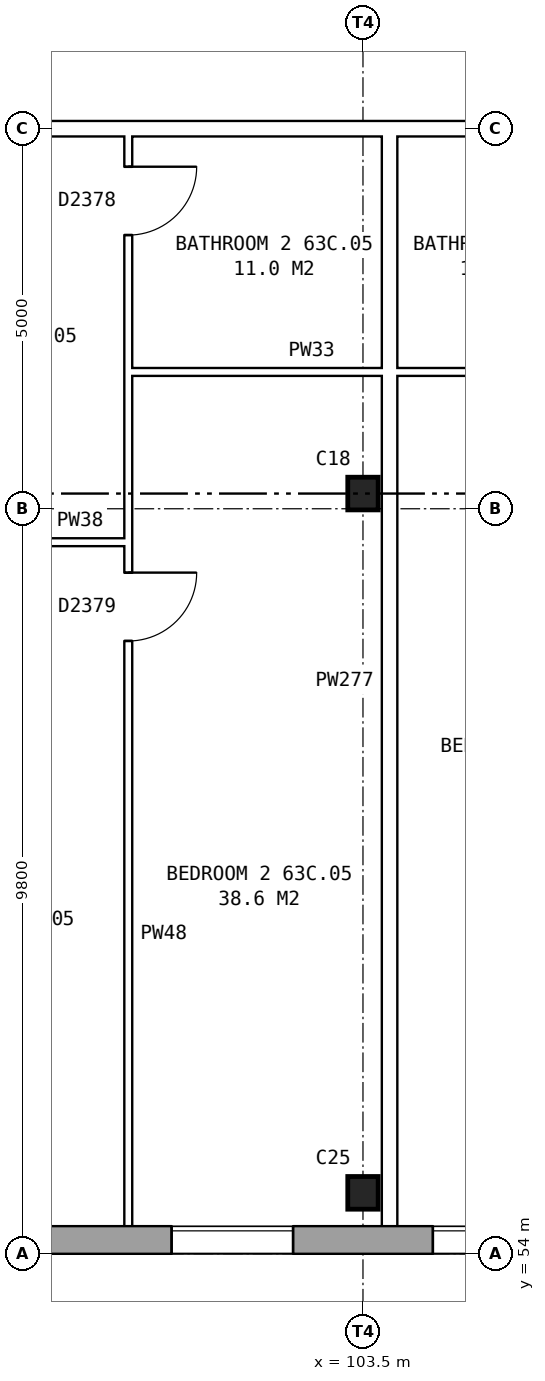
"""IFC4 building model, lengths in metres.
Left out: names, types, materials, properties, quantities, classifications, styles, units other than length and angle.
Written with IfcOpenShell. Run it as: python <this file> out.ifc"""

import sys

from ifc_helpers import new_model, si_unit, direction, frame, frame_2d, origin, origin_2d, place, context, subcontext, project, spatial, rectangle, i_section, extrude, element, fill, save


model = new_model("IFC4")
c1 = context("Model", 3, precision=1e-05, world=origin(), true_north=direction((0.0, 1.0)))
c2 = subcontext(c1, "Body", "Model", "MODEL_VIEW")
j1 = project(units=[si_unit("LENGTHUNIT", "METRE"), si_unit("PLANEANGLEUNIT", "RADIAN")], contexts=[c1])
p1 = place(None, origin())
s1 = spatial("IfcSite", under=j1, at=p1, CompositionType="ELEMENT")
p2 = place(p1, origin())
s2 = spatial("IfcBuilding", under=s1, at=p2, CompositionType="ELEMENT")
p3 = place(p2, frame((0.0, 0.0, 224.5)))
s3 = spatial("IfcBuildingStorey", under=s2, at=p3, CompositionType="ELEMENT", Elevation=224.5)
for number, where, z_axis, x_axis in (
    (1, (103.5, 54.8, 0.0), (0.0, 0.0, 1.0), (1.0, 0.0, 0.0)),
    (2, (103.5, 64.0, 0.0), (0.0, 0.0, 1.0), (1.0, 0.0, 0.0)),
):
    element("IfcColumn", number, at=place(p3, frame(where, z_axis=z_axis, x_axis=x_axis)), inside=s3, PredefinedType="COLUMN", context=c2, shape_type="SweptSolid", body=[
        extrude(i_section(OverallWidth=0.4, OverallDepth=0.43, WebThickness=0.04, FlangeThickness=0.04, at=origin_2d()), origin(), (0.0, 0.0, 1.0), 2.85),
    ])
p4 = place(p3, frame((75.95, 54.18, 0.0), z_axis=(0.0, 0.0, 1.0), x_axis=(1.0, 0.0, 0.0)))
e3 = element("IfcWall", 3, at=p4, inside=s3, PredefinedType="STANDARD", context=c2, shape_type="SweptSolid", body=[
    extrude(rectangle(XDim=55.1, YDim=0.36, at=frame_2d((27.55, 0.0))), origin(), (0.0, 0.0, 1.0), 2.85),
])
p5 = place(p4, frame((0.969, 0.0, 0.8)))
e4 = element("IfcOpeningElement", 4, at=p5, cuts=e3, PredefinedType="OPENING", context=c2, shape_type="SweptSolid", body=[
    extrude(rectangle(XDim=1.6, YDim=1.8, at=frame_2d((0.8, 0.9))), frame((0.0, 0.19, 0.0), z_axis=(0.0, -1.0, 0.0), x_axis=(1.0, 0.0, 0.0)), (0.0, 0.0, 1.0), 0.38),
])
p6 = place(p4, frame((4.406, 0.0, 0.8)))
e5 = element("IfcOpeningElement", 5, at=p6, cuts=e3, PredefinedType="OPENING", context=c2, shape_type="SweptSolid", body=[
    extrude(rectangle(XDim=1.6, YDim=1.8, at=frame_2d((0.8, 0.9))), frame((0.0, 0.19, 0.0), z_axis=(0.0, -1.0, 0.0), x_axis=(1.0, 0.0, 0.0)), (0.0, 0.0, 1.0), 0.38),
])
p7 = place(p4, frame((7.844, 0.0, 0.8)))
e6 = element("IfcOpeningElement", 6, at=p7, cuts=e3, PredefinedType="OPENING", context=c2, shape_type="SweptSolid", body=[
    extrude(rectangle(XDim=1.6, YDim=1.8, at=frame_2d((0.8, 0.9))), frame((0.0, 0.19, 0.0), z_axis=(0.0, -1.0, 0.0), x_axis=(1.0, 0.0, 0.0)), (0.0, 0.0, 1.0), 0.38),
])
p8 = place(p4, frame((11.281, 0.0, 0.8)))
e7 = element("IfcOpeningElement", 7, at=p8, cuts=e3, PredefinedType="OPENING", context=c2, shape_type="SweptSolid", body=[
    extrude(rectangle(XDim=1.6, YDim=1.8, at=frame_2d((0.8, 0.9))), frame((0.0, 0.19, 0.0), z_axis=(0.0, -1.0, 0.0), x_axis=(1.0, 0.0, 0.0)), (0.0, 0.0, 1.0), 0.38),
])
p9 = place(p4, frame((14.719, 0.0, 0.8)))
e8 = element("IfcOpeningElement", 8, at=p9, cuts=e3, PredefinedType="OPENING", context=c2, shape_type="SweptSolid", body=[
    extrude(rectangle(XDim=1.6, YDim=1.8, at=frame_2d((0.8, 0.9))), frame((0.0, 0.19, 0.0), z_axis=(0.0, -1.0, 0.0), x_axis=(1.0, 0.0, 0.0)), (0.0, 0.0, 1.0), 0.38),
])
p10 = place(p4, frame((18.156, 0.0, 0.8)))
e9 = element("IfcOpeningElement", 9, at=p10, cuts=e3, PredefinedType="OPENING", context=c2, shape_type="SweptSolid", body=[
    extrude(rectangle(XDim=1.6, YDim=1.8, at=frame_2d((0.8, 0.9))), frame((0.0, 0.19, 0.0), z_axis=(0.0, -1.0, 0.0), x_axis=(1.0, 0.0, 0.0)), (0.0, 0.0, 1.0), 0.38),
])
p11 = place(p4, frame((21.594, 0.0, 0.8)))
e10 = element("IfcOpeningElement", 10, at=p11, cuts=e3, PredefinedType="OPENING", context=c2, shape_type="SweptSolid", body=[
    extrude(rectangle(XDim=1.6, YDim=1.8, at=frame_2d((0.8, 0.9))), frame((0.0, 0.19, 0.0), z_axis=(0.0, -1.0, 0.0), x_axis=(1.0, 0.0, 0.0)), (0.0, 0.0, 1.0), 0.38),
])
p12 = place(p4, frame((25.031, 0.0, 0.8)))
e11 = element("IfcOpeningElement", 11, at=p12, cuts=e3, PredefinedType="OPENING", context=c2, shape_type="SweptSolid", body=[
    extrude(rectangle(XDim=1.6, YDim=1.8, at=frame_2d((0.8, 0.9))), frame((0.0, 0.19, 0.0), z_axis=(0.0, -1.0, 0.0), x_axis=(1.0, 0.0, 0.0)), (0.0, 0.0, 1.0), 0.38),
])
p13 = place(p4, frame((28.469, 0.0, 0.8)))
e12 = element("IfcOpeningElement", 12, at=p13, cuts=e3, PredefinedType="OPENING", context=c2, shape_type="SweptSolid", body=[
    extrude(rectangle(XDim=1.6, YDim=1.8, at=frame_2d((0.8, 0.9))), frame((0.0, 0.19, 0.0), z_axis=(0.0, -1.0, 0.0), x_axis=(1.0, 0.0, 0.0)), (0.0, 0.0, 1.0), 0.38),
])
p14 = place(p4, frame((31.906, 0.0, 0.8)))
e13 = element("IfcOpeningElement", 13, at=p14, cuts=e3, PredefinedType="OPENING", context=c2, shape_type="SweptSolid", body=[
    extrude(rectangle(XDim=1.6, YDim=1.8, at=frame_2d((0.8, 0.9))), frame((0.0, 0.19, 0.0), z_axis=(0.0, -1.0, 0.0), x_axis=(1.0, 0.0, 0.0)), (0.0, 0.0, 1.0), 0.38),
])
p15 = place(p4, frame((35.344, 0.0, 0.8)))
e14 = element("IfcOpeningElement", 14, at=p15, cuts=e3, PredefinedType="OPENING", context=c2, shape_type="SweptSolid", body=[
    extrude(rectangle(XDim=1.6, YDim=1.8, at=frame_2d((0.8, 0.9))), frame((0.0, 0.19, 0.0), z_axis=(0.0, -1.0, 0.0), x_axis=(1.0, 0.0, 0.0)), (0.0, 0.0, 1.0), 0.38),
])
p16 = place(p4, frame((38.781, 0.0, 0.8)))
e15 = element("IfcOpeningElement", 15, at=p16, cuts=e3, PredefinedType="OPENING", context=c2, shape_type="SweptSolid", body=[
    extrude(rectangle(XDim=1.6, YDim=1.8, at=frame_2d((0.8, 0.9))), frame((0.0, 0.19, 0.0), z_axis=(0.0, -1.0, 0.0), x_axis=(1.0, 0.0, 0.0)), (0.0, 0.0, 1.0), 0.38),
])
p17 = place(p4, frame((42.219, 0.0, 0.8)))
e16 = element("IfcOpeningElement", 16, at=p17, cuts=e3, PredefinedType="OPENING", context=c2, shape_type="SweptSolid", body=[
    extrude(rectangle(XDim=1.6, YDim=1.8, at=frame_2d((0.8, 0.9))), frame((0.0, 0.19, 0.0), z_axis=(0.0, -1.0, 0.0), x_axis=(1.0, 0.0, 0.0)), (0.0, 0.0, 1.0), 0.38),
])
p18 = place(p4, frame((45.656, 0.0, 0.8)))
e17 = element("IfcOpeningElement", 17, at=p18, cuts=e3, PredefinedType="OPENING", context=c2, shape_type="SweptSolid", body=[
    extrude(rectangle(XDim=1.6, YDim=1.8, at=frame_2d((0.8, 0.9))), frame((0.0, 0.19, 0.0), z_axis=(0.0, -1.0, 0.0), x_axis=(1.0, 0.0, 0.0)), (0.0, 0.0, 1.0), 0.38),
])
p19 = place(p4, frame((49.094, 0.0, 0.8)))
e18 = element("IfcOpeningElement", 18, at=p19, cuts=e3, PredefinedType="OPENING", context=c2, shape_type="SweptSolid", body=[
    extrude(rectangle(XDim=1.6, YDim=1.8, at=frame_2d((0.8, 0.9))), frame((0.0, 0.19, 0.0), z_axis=(0.0, -1.0, 0.0), x_axis=(1.0, 0.0, 0.0)), (0.0, 0.0, 1.0), 0.38),
])
p20 = place(p4, frame((52.531, 0.0, 0.8)))
e19 = element("IfcOpeningElement", 19, at=p20, cuts=e3, PredefinedType="OPENING", context=c2, shape_type="SweptSolid", body=[
    extrude(rectangle(XDim=1.6, YDim=1.8, at=frame_2d((0.8, 0.9))), frame((0.0, 0.19, 0.0), z_axis=(0.0, -1.0, 0.0), x_axis=(1.0, 0.0, 0.0)), (0.0, 0.0, 1.0), 0.38),
])
p21 = place(p3, frame((96.975, 63.36, 0.0), z_axis=(0.0, 0.0, 1.0), x_axis=(1.0, 0.0, 0.0)))
e20 = element("IfcWall", 20, at=p21, inside=s3, PredefinedType="PARTITIONING", context=c2, shape_type="SweptSolid", body=[
    extrude(rectangle(XDim=3.437, YDim=0.1, at=frame_2d((1.719, 0.0))), origin(), (0.0, 0.0, 1.0), 2.85),
])
p22 = place(p21, frame((1.269, 0.0, 0.0)))
e21 = element("IfcOpeningElement", 21, at=p22, cuts=e20, PredefinedType="OPENING", context=c2, shape_type="SweptSolid", body=[
    extrude(rectangle(XDim=0.9, YDim=2.1, at=frame_2d((0.45, 1.05))), frame((0.0, 0.06, 0.0), z_axis=(0.0, -1.0, 0.0), x_axis=(1.0, 0.0, 0.0)), (0.0, 0.0, 1.0), 0.12),
])
p23 = place(p3, frame((100.412, 65.6, 0.0), z_axis=(0.0, 0.0, 1.0), x_axis=(1.0, 0.0, 0.0)))
e22 = element("IfcWall", 22, at=p23, inside=s3, PredefinedType="PARTITIONING", context=c2, shape_type="SweptSolid", body=[
    extrude(rectangle(XDim=6.875, YDim=0.1, at=frame_2d((3.438, 0.0))), origin(), (0.0, 0.0, 1.0), 2.85),
])
p24 = place(p3, frame((75.64, 68.8, 0.0), z_axis=(0.0, 0.0, 1.0), x_axis=(1.0, 0.0, 0.0)))
e23 = element("IfcWall", 23, at=p24, inside=s3, PredefinedType="PARTITIONING", context=c2, shape_type="SweptSolid", body=[
    extrude(rectangle(XDim=55.72, YDim=0.2, at=frame_2d((27.86, 0.0))), origin(), (0.0, 0.0, 1.0), 2.85),
])
p25 = place(p24, frame((1.399, 0.0, 0.0)))
e24 = element("IfcOpeningElement", 24, at=p25, cuts=e23, PredefinedType="OPENING", context=c2, shape_type="SweptSolid", body=[
    extrude(rectangle(XDim=1.0, YDim=2.1, at=frame_2d((0.5, 1.05))), frame((0.0, 0.11, 0.0), z_axis=(0.0, -1.0, 0.0), x_axis=(1.0, 0.0, 0.0)), (0.0, 0.0, 1.0), 0.22),
])
p26 = place(p24, frame((12.241, 0.0, 0.0)))
e25 = element("IfcOpeningElement", 25, at=p26, cuts=e23, PredefinedType="OPENING", context=c2, shape_type="SweptSolid", body=[
    extrude(rectangle(XDim=1.0, YDim=2.1, at=frame_2d((0.5, 1.05))), frame((0.0, 0.11, 0.0), z_axis=(0.0, -1.0, 0.0), x_axis=(1.0, 0.0, 0.0)), (0.0, 0.0, 1.0), 0.22),
])
p27 = place(p24, frame((22.553, 0.0, 0.0)))
e26 = element("IfcOpeningElement", 26, at=p27, cuts=e23, PredefinedType="OPENING", context=c2, shape_type="SweptSolid", body=[
    extrude(rectangle(XDim=1.0, YDim=2.1, at=frame_2d((0.5, 1.05))), frame((0.0, 0.11, 0.0), z_axis=(0.0, -1.0, 0.0), x_axis=(1.0, 0.0, 0.0)), (0.0, 0.0, 1.0), 0.22),
])
p28 = place(p24, frame((32.866, 0.0, 0.0)))
e27 = element("IfcOpeningElement", 27, at=p28, cuts=e23, PredefinedType="OPENING", context=c2, shape_type="SweptSolid", body=[
    extrude(rectangle(XDim=1.0, YDim=2.1, at=frame_2d((0.5, 1.05))), frame((0.0, 0.11, 0.0), z_axis=(0.0, -1.0, 0.0), x_axis=(1.0, 0.0, 0.0)), (0.0, 0.0, 1.0), 0.22),
])
p29 = place(p24, frame((36.303, 0.0, 0.0)))
e28 = element("IfcOpeningElement", 28, at=p29, cuts=e23, PredefinedType="OPENING", context=c2, shape_type="SweptSolid", body=[
    extrude(rectangle(XDim=1.0, YDim=2.1, at=frame_2d((0.5, 1.05))), frame((0.0, 0.11, 0.0), z_axis=(0.0, -1.0, 0.0), x_axis=(1.0, 0.0, 0.0)), (0.0, 0.0, 1.0), 0.22),
])
p30 = place(p24, frame((46.616, 0.0, 0.0)))
e29 = element("IfcOpeningElement", 29, at=p30, cuts=e23, PredefinedType="OPENING", context=c2, shape_type="SweptSolid", body=[
    extrude(rectangle(XDim=1.0, YDim=2.1, at=frame_2d((0.5, 1.05))), frame((0.0, 0.11, 0.0), z_axis=(0.0, -1.0, 0.0), x_axis=(1.0, 0.0, 0.0)), (0.0, 0.0, 1.0), 0.22),
])
p31 = place(p24, frame((50.053, 0.0, 0.0)))
e30 = element("IfcOpeningElement", 30, at=p31, cuts=e23, PredefinedType="OPENING", context=c2, shape_type="SweptSolid", body=[
    extrude(rectangle(XDim=1.0, YDim=2.1, at=frame_2d((0.5, 1.05))), frame((0.0, 0.11, 0.0), z_axis=(0.0, -1.0, 0.0), x_axis=(1.0, 0.0, 0.0)), (0.0, 0.0, 1.0), 0.22),
])
p32 = place(p3, frame((100.412, 54.36, 0.0), z_axis=(0.0, 0.0, 1.0), x_axis=(0.0, 1.0, 0.0)))
e31 = element("IfcWall", 31, at=p32, inside=s3, PredefinedType="PARTITIONING", context=c2, shape_type="SweptSolid", body=[
    extrude(rectangle(XDim=14.34, YDim=0.1, at=frame_2d((7.17, 0.0))), origin(), (0.0, 0.0, 1.0), 2.85),
])
p33 = place(p32, frame((7.7, 0.0, 0.0)))
e32 = element("IfcOpeningElement", 32, at=p33, cuts=e31, PredefinedType="OPENING", context=c2, shape_type="SweptSolid", body=[
    extrude(rectangle(XDim=0.9, YDim=2.1, at=frame_2d((0.45, 1.05))), frame((0.0, 0.06, 0.0), z_axis=(0.0, -1.0, 0.0), x_axis=(1.0, 0.0, 0.0)), (0.0, 0.0, 1.0), 0.12),
])
p34 = place(p32, frame((13.04, 0.0, 0.0)))
e33 = element("IfcOpeningElement", 33, at=p34, cuts=e31, PredefinedType="OPENING", context=c2, shape_type="SweptSolid", body=[
    extrude(rectangle(XDim=0.9, YDim=2.1, at=frame_2d((0.45, 1.05))), frame((0.0, 0.06, 0.0), z_axis=(0.0, -1.0, 0.0), x_axis=(1.0, 0.0, 0.0)), (0.0, 0.0, 1.0), 0.12),
])
p35 = place(p3, frame((103.85, 54.36, 0.0), z_axis=(0.0, 0.0, 1.0), x_axis=(0.0, 1.0, 0.0)))
e34 = element("IfcWall", 34, at=p35, inside=s3, PredefinedType="PARTITIONING", context=c2, shape_type="SweptSolid", body=[
    extrude(rectangle(XDim=14.34, YDim=0.2, at=frame_2d((7.17, 0.0))), origin(), (0.0, 0.0, 1.0), 2.85),
])
p36 = place(p12, origin())
e35 = element("IfcWindow", 35, at=p36, inside=s3, PartitioningType="SINGLE_PANEL", PredefinedType="WINDOW", context=c2, shape_type="SweptSolid", body=[
    extrude(rectangle(XDim=1.6, YDim=1.8, at=frame_2d((0.8, 0.9))), frame((0.0, 0.15, 0.0), z_axis=(0.0, -1.0, 0.0), x_axis=(1.0, 0.0, 0.0)), (0.0, 0.0, 1.0), 0.06),
])
fill(e11, e35)
p37 = place(p13, origin())
e36 = element("IfcWindow", 36, at=p37, inside=s3, PartitioningType="SINGLE_PANEL", PredefinedType="WINDOW", context=c2, shape_type="SweptSolid", body=[
    extrude(rectangle(XDim=1.6, YDim=1.8, at=frame_2d((0.8, 0.9))), frame((0.0, 0.15, 0.0), z_axis=(0.0, -1.0, 0.0), x_axis=(1.0, 0.0, 0.0)), (0.0, 0.0, 1.0), 0.06),
])
fill(e12, e36)
p38 = place(p33, frame((0.9, 0.0, 0.0), z_axis=(0.0, 0.0, 1.0), x_axis=(-1.0, 0.0, 0.0)))
e37 = element("IfcDoor", 37, at=p38, inside=s3, OperationType="SINGLE_SWING_LEFT", PredefinedType="DOOR", context=c2, shape_type="SweptSolid", body=[
    extrude(rectangle(XDim=0.9, YDim=2.1, at=frame_2d((0.45, 1.05))), frame((0.0, 0.025, 0.0), z_axis=(0.0, -1.0, 0.0), x_axis=(1.0, 0.0, 0.0)), (0.0, 0.0, 1.0), 0.05),
])
fill(e32, e37)
p39 = place(p34, frame((0.9, 0.0, 0.0), z_axis=(0.0, 0.0, 1.0), x_axis=(-1.0, 0.0, 0.0)))
e38 = element("IfcDoor", 38, at=p39, inside=s3, OperationType="SINGLE_SWING_LEFT", PredefinedType="DOOR", context=c2, shape_type="SweptSolid", body=[
    extrude(rectangle(XDim=0.9, YDim=2.1, at=frame_2d((0.45, 1.05))), frame((0.0, 0.025, 0.0), z_axis=(0.0, -1.0, 0.0), x_axis=(1.0, 0.0, 0.0)), (0.0, 0.0, 1.0), 0.05),
])
fill(e33, e38)
save(model, sys.argv[1])
